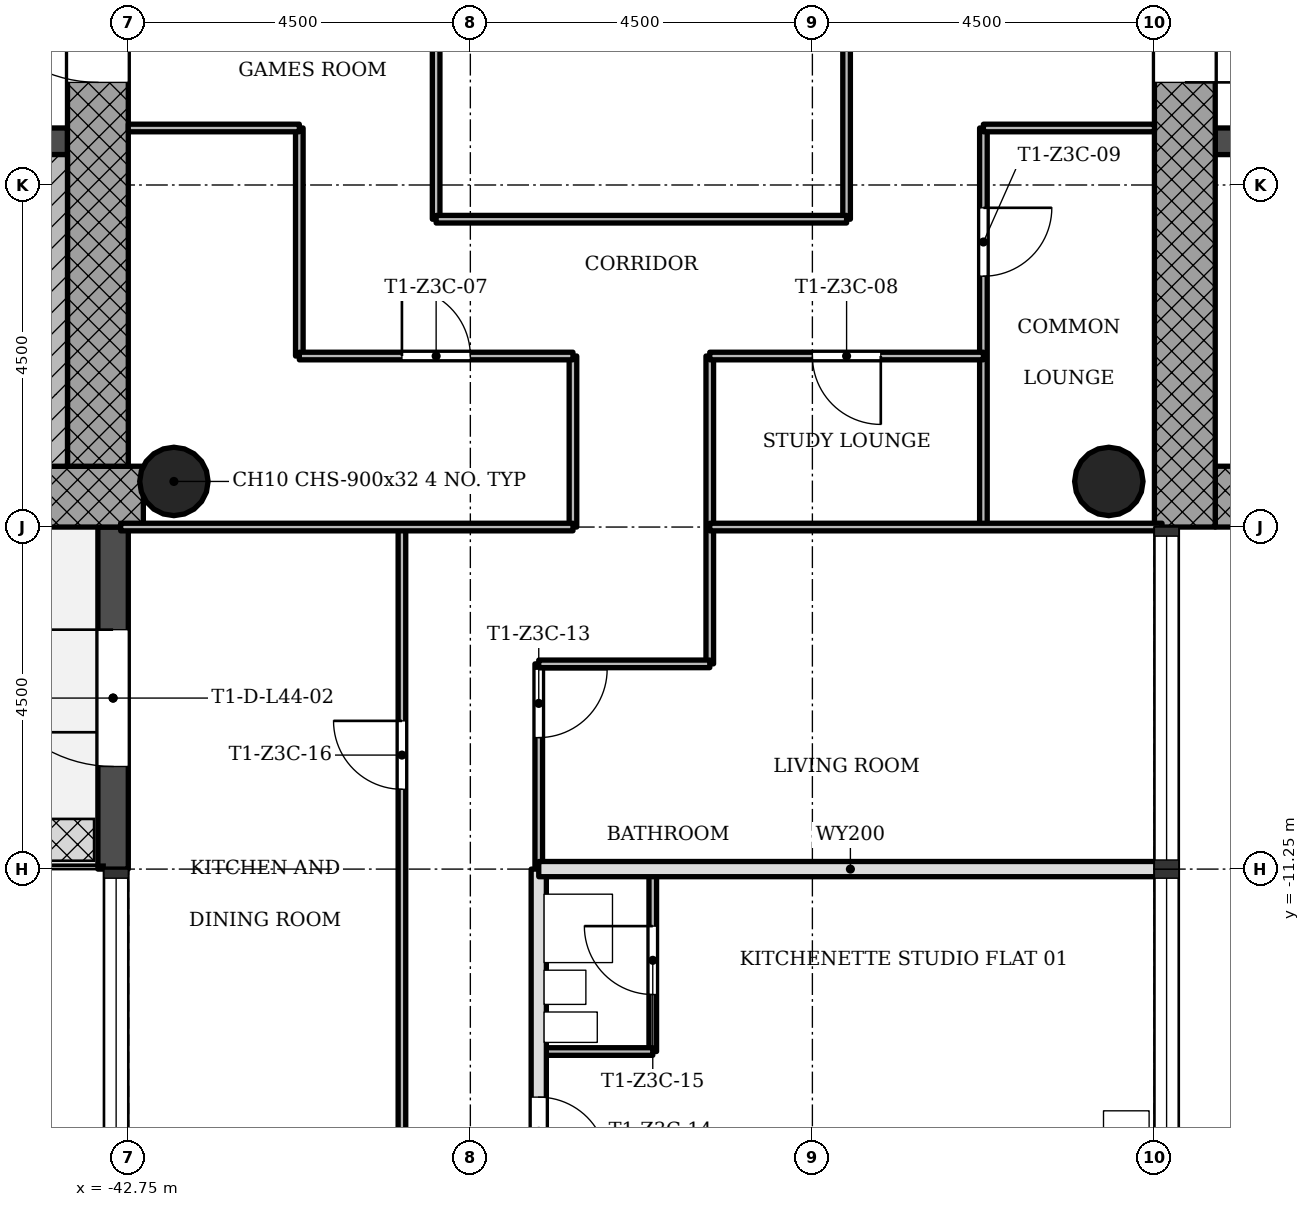
"""IFC4 building model, lengths in metres.
Left out: names, types, materials, properties, quantities, classifications, styles, units other than length and angle.
Written with IfcOpenShell. Run it as: python <this file> out.ifc"""

import sys

from ifc_helpers import new_model, si_unit, direction, frame, frame_2d, origin, origin_2d, place, context, subcontext, project, spatial, rectangle, hollow_circle, extrude, element, fill, save


model = new_model("IFC4")
c1 = context("Model", 3, precision=1e-05, world=origin(), true_north=direction((0.0, 1.0)))
c2 = subcontext(c1, "Body", "Model", "MODEL_VIEW")
j1 = project(units=[si_unit("LENGTHUNIT", "METRE"), si_unit("PLANEANGLEUNIT", "RADIAN")], contexts=[c1])
p1 = place(None, origin())
s1 = spatial("IfcSite", under=j1, at=p1, CompositionType="ELEMENT")
p2 = place(p1, origin())
s2 = spatial("IfcBuilding", under=s1, at=p2, CompositionType="ELEMENT")
p3 = place(p2, frame((0.0, 0.0, 160.9)))
s3 = spatial("IfcBuildingStorey", under=s2, at=p3, CompositionType="ELEMENT", Elevation=160.9)
p4 = place(p3, frame((-28.45, -6.35, 0.0), z_axis=(0.0, 0.0, 1.0), x_axis=(1.0, 0.0, 0.0)))
e1 = element("IfcWall", 1, at=p4, inside=s3, PredefinedType="SHEAR", context=c2, shape_type="SweptSolid", body=[
    extrude(rectangle(XDim=8.2, YDim=0.8, at=frame_2d((4.1, 0.0))), origin(), (0.0, 0.0, 1.0), 3.4),
])
p5 = place(p3, frame((-28.85, 5.95, 0.0), z_axis=(0.0, 0.0, 1.0), x_axis=(0.0, -1.0, 0.0)))
e2 = element("IfcWall", 2, at=p5, inside=s3, PredefinedType="SHEAR", context=c2, shape_type="SweptSolid", body=[
    extrude(rectangle(XDim=12.7, YDim=0.8, at=frame_2d((6.35, 0.0))), origin(), (0.0, 0.0, 1.0), 3.4),
])
p6 = place(p5, frame((5.05, 0.0, 0.0)))
e3 = element("IfcOpeningElement", 3, at=p6, cuts=e2, PredefinedType="OPENING", context=c2, shape_type="SweptSolid", body=[
    extrude(rectangle(XDim=1.8, YDim=2.1, at=frame_2d((0.9, 1.05))), frame((0.0, 0.41, 0.0), z_axis=(0.0, -1.0, 0.0), x_axis=(1.0, 0.0, 0.0)), (0.0, 0.0, 1.0), 0.82),
])
p7 = place(p3, frame((-28.45, -1.675, 0.0), z_axis=(0.0, 0.0, 1.0), x_axis=(1.0, 0.0, 0.0)))
e4 = element("IfcWall", 4, at=p7, inside=s3, PredefinedType="SHEAR", context=c2, shape_type="SweptSolid", body=[
    extrude(rectangle(XDim=7.4, YDim=0.35, at=frame_2d((3.7, 0.0))), origin(), (0.0, 0.0, 1.0), 3.4),
])
p8 = place(p7, frame((0.95, 0.0, 0.0)))
e5 = element("IfcOpeningElement", 5, at=p8, cuts=e4, PredefinedType="OPENING", context=c2, shape_type="SweptSolid", body=[
    extrude(rectangle(XDim=1.1, YDim=2.1, at=frame_2d((0.55, 1.05))), frame((0.0, 0.185, 0.0), z_axis=(0.0, -1.0, 0.0), x_axis=(1.0, 0.0, 0.0)), (0.0, 0.0, 1.0), 0.37),
])
p9 = place(p7, frame((3.15, 0.0, 0.0)))
e6 = element("IfcOpeningElement", 6, at=p9, cuts=e4, PredefinedType="OPENING", context=c2, shape_type="SweptSolid", body=[
    extrude(rectangle(XDim=1.1, YDim=2.1, at=frame_2d((0.55, 1.05))), frame((0.0, 0.185, 0.0), z_axis=(0.0, -1.0, 0.0), x_axis=(1.0, 0.0, 0.0)), (0.0, 0.0, 1.0), 0.37),
])
p10 = place(p7, frame((5.35, 0.0, 0.0)))
e7 = element("IfcOpeningElement", 7, at=p10, cuts=e4, PredefinedType="OPENING", context=c2, shape_type="SweptSolid", body=[
    extrude(rectangle(XDim=1.1, YDim=2.1, at=frame_2d((0.55, 1.05))), frame((0.0, 0.185, 0.0), z_axis=(0.0, -1.0, 0.0), x_axis=(1.0, 0.0, 0.0)), (0.0, 0.0, 1.0), 0.37),
])
p11 = place(p3, frame((-50.95, -6.35, 0.0), z_axis=(0.0, 0.0, 1.0), x_axis=(1.0, 0.0, 0.0)))
e8 = element("IfcWall", 8, at=p11, inside=s3, PredefinedType="SHEAR", context=c2, shape_type="SweptSolid", body=[
    extrude(rectangle(XDim=8.398, YDim=0.8, at=frame_2d((4.199, 0.0))), origin(), (0.0, 0.0, 1.0), 3.4),
])
p12 = place(p3, frame((-43.15, -5.95, 0.0), z_axis=(0.0, 0.0, 1.0), x_axis=(0.0, 1.0, 0.0)))
e9 = element("IfcWall", 9, at=p12, inside=s3, PredefinedType="SHEAR", context=c2, shape_type="SweptSolid", body=[
    extrude(rectangle(XDim=12.7, YDim=0.8, at=frame_2d((6.35, 0.0))), origin(), (0.0, 0.0, 1.0), 3.4),
])
p13 = place(p12, frame((5.05, 0.0, 0.0)))
e10 = element("IfcOpeningElement", 10, at=p13, cuts=e9, PredefinedType="OPENING", context=c2, shape_type="SweptSolid", body=[
    extrude(rectangle(XDim=1.8, YDim=2.1, at=frame_2d((0.9, 1.05))), frame((0.0, 0.41, 0.0), z_axis=(0.0, -1.0, 0.0), x_axis=(1.0, 0.0, 0.0)), (0.0, 0.0, 1.0), 0.82),
])
p14 = place(p3, frame((-50.95, -1.675, 0.0), z_axis=(0.0, 0.0, 1.0), x_axis=(1.0, 0.0, 0.0)))
e11 = element("IfcWall", 11, at=p14, inside=s3, PredefinedType="SHEAR", context=c2, shape_type="SweptSolid", body=[
    extrude(rectangle(XDim=7.4, YDim=0.35, at=frame_2d((3.7, 0.0))), origin(), (0.0, 0.0, 1.0), 3.4),
])
p15 = place(p14, frame((5.65, 0.0, 0.0)))
e12 = element("IfcOpeningElement", 12, at=p15, cuts=e11, PredefinedType="OPENING", context=c2, shape_type="SweptSolid", body=[
    extrude(rectangle(XDim=0.9, YDim=2.1, at=frame_2d((0.45, 1.05))), frame((0.0, 0.185, 0.0), z_axis=(0.0, -1.0, 0.0), x_axis=(1.0, 0.0, 0.0)), (0.0, 0.0, 1.0), 0.37),
])
for number, where, z_axis, x_axis in (
    (13, (-42.15, -6.15, 0.0), (0.0, 0.0, 1.0), (1.0, 0.0, 0.0)),
    (14, (-29.85, -6.15, 0.0), (0.0, 0.0, 1.0), (1.0, 0.0, 0.0)),
):
    element("IfcColumn", number, at=place(p3, frame(where, z_axis=z_axis, x_axis=x_axis)), inside=s3, PredefinedType="COLUMN", context=c2, shape_type="SweptSolid", body=[
        extrude(hollow_circle(Radius=0.45, WallThickness=0.032, at=origin_2d()), origin(), (0.0, 0.0, 1.0), 3.4),
    ])
p16 = place(p3, frame((-42.95, -6.75, -0.02), z_axis=(0.0, 0.0, 1.0), x_axis=(0.0, -1.0, 0.0)))
e15 = element("IfcWall", 15, at=p16, inside=s3, PredefinedType="STANDARD", context=c2, shape_type="SweptSolid", body=[
    extrude(rectangle(XDim=4.5, YDim=0.4, at=frame_2d((2.25, 0.0))), origin(), (0.0, 0.0, 1.0), 3.12),
])
p17 = place(p16, frame((1.35, 0.0, 0.02)))
e16 = element("IfcOpeningElement", 16, at=p17, cuts=e15, PredefinedType="OPENING", context=c2, shape_type="SweptSolid", body=[
    extrude(rectangle(XDim=1.8, YDim=2.1, at=frame_2d((0.9, 1.05))), frame((0.0, 0.21, 0.0), z_axis=(0.0, -1.0, 0.0), x_axis=(1.0, 0.0, 0.0)), (0.0, 0.0, 1.0), 0.42),
])
p18 = place(p3, frame((-40.5, -4.5, 0.0), z_axis=(0.0, 0.0, 1.0), x_axis=(0.0, 1.0, 0.0)))
e17 = element("IfcWall", 17, at=p18, inside=s3, PredefinedType="PARTITIONING", context=c2, shape_type="SweptSolid", body=[
    extrude(rectangle(XDim=3.0, YDim=0.1, at=frame_2d((1.5, 0.0))), origin(), (0.0, 0.0, 1.0), 3.0),
])
p19 = place(p3, frame((-39.15, -15.75, 0.0), z_axis=(0.0, 0.0, 1.0), x_axis=(0.0, 1.0, 0.0)))
e18 = element("IfcWall", 18, at=p19, inside=s3, PredefinedType="PARTITIONING", context=c2, shape_type="SweptSolid", body=[
    extrude(rectangle(XDim=9.0, YDim=0.1, at=frame_2d((4.5, 0.0))), origin(), (0.0, 0.0, 1.0), 3.0),
])
p20 = place(p19, frame((5.55, 0.0, 0.0)))
e19 = element("IfcOpeningElement", 19, at=p20, cuts=e18, PredefinedType="OPENING", context=c2, shape_type="SweptSolid", body=[
    extrude(rectangle(XDim=0.9, YDim=2.1, at=frame_2d((0.45, 1.05))), frame((0.0, 0.06, 0.0), z_axis=(0.0, -1.0, 0.0), x_axis=(1.0, 0.0, 0.0)), (0.0, 0.0, 1.0), 0.12),
])
p21 = place(p3, frame((-38.7, -2.7, 0.0), z_axis=(0.0, 0.0, 1.0), x_axis=(0.0, 1.0, 0.0)))
e20 = element("IfcWall", 20, at=p21, inside=s3, PredefinedType="PARTITIONING", context=c2, shape_type="SweptSolid", body=[
    extrude(rectangle(XDim=5.4, YDim=0.1, at=frame_2d((2.7, 0.0))), origin(), (0.0, 0.0, 1.0), 3.0),
])
p22 = place(p3, frame((-37.35, -11.25, 0.0), z_axis=(0.0, 0.0, 1.0), x_axis=(0.0, 1.0, 0.0)))
e21 = element("IfcWall", 21, at=p22, inside=s3, PredefinedType="PARTITIONING", context=c2, shape_type="SweptSolid", body=[
    extrude(rectangle(XDim=2.7, YDim=0.1, at=frame_2d((1.35, 0.0))), origin(), (0.0, 0.0, 1.0), 3.0),
])
p23 = place(p22, frame((1.73, 0.0, 0.0)))
e22 = element("IfcOpeningElement", 22, at=p23, cuts=e21, PredefinedType="OPENING", context=c2, shape_type="SweptSolid", body=[
    extrude(rectangle(XDim=0.9, YDim=2.1, at=frame_2d((0.45, 1.05))), frame((0.0, 0.06, 0.0), z_axis=(0.0, -1.0, 0.0), x_axis=(1.0, 0.0, 0.0)), (0.0, 0.0, 1.0), 0.12),
])
p24 = place(p3, frame((-37.35, -15.75, 0.0), z_axis=(0.0, 0.0, 1.0), x_axis=(0.0, 1.0, 0.0)))
e23 = element("IfcWall", 23, at=p24, inside=s3, PredefinedType="SOLIDWALL", context=c2, shape_type="SweptSolid", body=[
    extrude(rectangle(XDim=4.5, YDim=0.2, at=frame_2d((2.25, 0.0))), origin(), (0.0, 0.0, 1.0), 3.0),
])
p25 = place(p24, frame((0.6, 0.0, 0.0)))
e24 = element("IfcOpeningElement", 24, at=p25, cuts=e23, PredefinedType="OPENING", context=c2, shape_type="SweptSolid", body=[
    extrude(rectangle(XDim=0.9, YDim=2.1, at=frame_2d((0.45, 1.05))), frame((0.0, 0.11, 0.0), z_axis=(0.0, -1.0, 0.0), x_axis=(1.0, 0.0, 0.0)), (0.0, 0.0, 1.0), 0.22),
])
p26 = place(p3, frame((-36.9, -6.75, 0.0), z_axis=(0.0, 0.0, 1.0), x_axis=(0.0, 1.0, 0.0)))
e25 = element("IfcWall", 25, at=p26, inside=s3, PredefinedType="PARTITIONING", context=c2, shape_type="SweptSolid", body=[
    extrude(rectangle(XDim=2.25, YDim=0.1, at=frame_2d((1.125, 0.0))), origin(), (0.0, 0.0, 1.0), 3.0),
])
p27 = place(p3, frame((-35.85, -13.65, 0.0), z_axis=(0.0, 0.0, 1.0), x_axis=(0.0, 1.0, 0.0)))
e26 = element("IfcWall", 26, at=p27, inside=s3, PredefinedType="PARTITIONING", context=c2, shape_type="SweptSolid", body=[
    extrude(rectangle(XDim=2.4, YDim=0.1, at=frame_2d((1.2, 0.0))), origin(), (0.0, 0.0, 1.0), 3.0),
])
p28 = place(p27, frame((0.75, 0.0, 0.0)))
e27 = element("IfcOpeningElement", 27, at=p28, cuts=e26, PredefinedType="OPENING", context=c2, shape_type="SweptSolid", body=[
    extrude(rectangle(XDim=0.9, YDim=2.1, at=frame_2d((0.45, 1.05))), frame((0.0, 0.06, 0.0), z_axis=(0.0, -1.0, 0.0), x_axis=(1.0, 0.0, 0.0)), (0.0, 0.0, 1.0), 0.12),
])
p29 = place(p3, frame((-35.1, -8.55, 0.0), z_axis=(0.0, 0.0, 1.0), x_axis=(0.0, 1.0, 0.0)))
e28 = element("IfcWall", 28, at=p29, inside=s3, PredefinedType="PARTITIONING", context=c2, shape_type="SweptSolid", body=[
    extrude(rectangle(XDim=4.05, YDim=0.1, at=frame_2d((2.025, 0.0))), origin(), (0.0, 0.0, 1.0), 3.0),
])
p30 = place(p3, frame((-33.3, -2.7, 0.0), z_axis=(0.0, 0.0, 1.0), x_axis=(0.0, 1.0, 0.0)))
e29 = element("IfcWall", 29, at=p30, inside=s3, PredefinedType="PARTITIONING", context=c2, shape_type="SweptSolid", body=[
    extrude(rectangle(XDim=5.4, YDim=0.1, at=frame_2d((2.7, 0.0))), origin(), (0.0, 0.0, 1.0), 3.0),
])
p31 = place(p30, frame((2.25, 0.0, 0.0)))
e30 = element("IfcOpeningElement", 30, at=p31, cuts=e29, PredefinedType="OPENING", context=c2, shape_type="SweptSolid", body=[
    extrude(rectangle(XDim=0.9, YDim=2.1, at=frame_2d((0.45, 1.05))), frame((0.0, 0.06, 0.0), z_axis=(0.0, -1.0, 0.0), x_axis=(1.0, 0.0, 0.0)), (0.0, 0.0, 1.0), 0.12),
])
p32 = place(p3, frame((-31.5, -6.75, 0.0), z_axis=(0.0, 0.0, 1.0), x_axis=(0.0, 1.0, 0.0)))
e31 = element("IfcWall", 31, at=p32, inside=s3, PredefinedType="PARTITIONING", context=c2, shape_type="SweptSolid", body=[
    extrude(rectangle(XDim=5.25, YDim=0.1, at=frame_2d((2.625, 0.0))), origin(), (0.0, 0.0, 1.0), 3.0),
])
p33 = place(p32, frame((3.3, 0.0, 0.0)))
e32 = element("IfcOpeningElement", 32, at=p33, cuts=e31, PredefinedType="OPENING", context=c2, shape_type="SweptSolid", body=[
    extrude(rectangle(XDim=0.9, YDim=2.1, at=frame_2d((0.45, 1.05))), frame((0.0, 0.06, 0.0), z_axis=(0.0, -1.0, 0.0), x_axis=(1.0, 0.0, 0.0)), (0.0, 0.0, 1.0), 0.12),
])
p34 = place(p3, frame((-37.35, -13.65, 0.0), z_axis=(0.0, 0.0, 1.0), x_axis=(1.0, 0.0, 0.0)))
e33 = element("IfcWall", 33, at=p34, inside=s3, PredefinedType="PARTITIONING", context=c2, shape_type="SweptSolid", body=[
    extrude(rectangle(XDim=1.5, YDim=0.1, at=frame_2d((0.75, 0.0))), origin(), (0.0, 0.0, 1.0), 3.0),
])
p35 = place(p3, frame((-37.35, -11.25, 0.0), z_axis=(0.0, 0.0, 1.0), x_axis=(1.0, 0.0, 0.0)))
e34 = element("IfcWall", 34, at=p35, inside=s3, PredefinedType="SOLIDWALL", context=c2, shape_type="SweptSolid", body=[
    extrude(rectangle(XDim=8.2, YDim=0.2, at=frame_2d((4.1, 0.0))), origin(), (0.0, 0.0, 1.0), 3.0),
])
p36 = place(p3, frame((-37.35, -8.55, 0.0), z_axis=(0.0, 0.0, 1.0), x_axis=(1.0, 0.0, 0.0)))
e35 = element("IfcWall", 35, at=p36, inside=s3, PredefinedType="PARTITIONING", context=c2, shape_type="SweptSolid", body=[
    extrude(rectangle(XDim=2.25, YDim=0.1, at=frame_2d((1.125, 0.0))), origin(), (0.0, 0.0, 1.0), 3.0),
])
for number, where, z_axis, x_axis in (
    (36, (-42.85, -6.75, 0.0), (0.0, 0.0, 1.0), (1.0, 0.0, 0.0)),
    (37, (-35.1, -6.75, 0.0), (0.0, 0.0, 1.0), (1.0, 0.0, 0.0)),
):
    element("IfcWall", number, at=place(p3, frame(where, z_axis=z_axis, x_axis=x_axis)), inside=s3, PredefinedType="PARTITIONING", context=c2, shape_type="SweptSolid", body=[
        extrude(rectangle(XDim=5.95, YDim=0.1, at=frame_2d((2.975, 0.0))), origin(), (0.0, 0.0, 1.0), 3.0),
    ])
p37 = place(p3, frame((-40.5, -4.5, 0.0), z_axis=(0.0, 0.0, 1.0), x_axis=(1.0, 0.0, 0.0)))
e38 = element("IfcWall", 38, at=p37, inside=s3, PredefinedType="PARTITIONING", context=c2, shape_type="SweptSolid", body=[
    extrude(rectangle(XDim=3.6, YDim=0.1, at=frame_2d((1.8, 0.0))), origin(), (0.0, 0.0, 1.0), 3.0),
])
p38 = place(p37, frame((1.35, 0.0, 0.0)))
e39 = element("IfcOpeningElement", 39, at=p38, cuts=e38, PredefinedType="OPENING", context=c2, shape_type="SweptSolid", body=[
    extrude(rectangle(XDim=0.9, YDim=2.1, at=frame_2d((0.45, 1.05))), frame((0.0, 0.06, 0.0), z_axis=(0.0, -1.0, 0.0), x_axis=(1.0, 0.0, 0.0)), (0.0, 0.0, 1.0), 0.12),
])
p39 = place(p3, frame((-35.1, -4.5, 0.0), z_axis=(0.0, 0.0, 1.0), x_axis=(1.0, 0.0, 0.0)))
e40 = element("IfcWall", 40, at=p39, inside=s3, PredefinedType="PARTITIONING", context=c2, shape_type="SweptSolid", body=[
    extrude(rectangle(XDim=3.6, YDim=0.1, at=frame_2d((1.8, 0.0))), origin(), (0.0, 0.0, 1.0), 3.0),
])
p40 = place(p39, frame((1.35, 0.0, 0.0)))
e41 = element("IfcOpeningElement", 41, at=p40, cuts=e40, PredefinedType="OPENING", context=c2, shape_type="SweptSolid", body=[
    extrude(rectangle(XDim=0.9, YDim=2.1, at=frame_2d((0.45, 1.05))), frame((0.0, 0.06, 0.0), z_axis=(0.0, -1.0, 0.0), x_axis=(1.0, 0.0, 0.0)), (0.0, 0.0, 1.0), 0.12),
])
p41 = place(p3, frame((-38.7, -2.7, 0.0), z_axis=(0.0, 0.0, 1.0), x_axis=(1.0, 0.0, 0.0)))
e42 = element("IfcWall", 42, at=p41, inside=s3, PredefinedType="PARTITIONING", context=c2, shape_type="SweptSolid", body=[
    extrude(rectangle(XDim=5.4, YDim=0.1, at=frame_2d((2.7, 0.0))), origin(), (0.0, 0.0, 1.0), 3.0),
])
for number, where, z_axis, x_axis in (
    (43, (-42.75, -1.5, 0.0), (0.0, 0.0, 1.0), (1.0, 0.0, 0.0)),
    (44, (-31.5, -1.5, 0.0), (0.0, 0.0, 1.0), (1.0, 0.0, 0.0)),
):
    element("IfcWall", number, at=place(p3, frame(where, z_axis=z_axis, x_axis=x_axis)), inside=s3, PredefinedType="PARTITIONING", context=c2, shape_type="SweptSolid", body=[
        extrude(rectangle(XDim=2.25, YDim=0.1, at=frame_2d((1.125, 0.0))), origin(), (0.0, 0.0, 1.0), 3.0),
    ])
p42 = place(p3, frame((-43.75, -1.85, 0.0), z_axis=(0.0, 0.0, 1.0), x_axis=(0.0, -1.0, 0.0)))
e45 = element("IfcWall", 45, at=p42, inside=s3, PredefinedType="SHEAR", context=c2, shape_type="SweptSolid", body=[
    extrude(rectangle(XDim=4.1, YDim=0.4, at=frame_2d((2.05, 0.0))), origin(), (0.0, 0.0, 1.0), 3.4),
])
p43 = place(p17, origin())
e46 = element("IfcDoor", 46, at=p43, inside=s3, OperationType="SINGLE_SWING_LEFT", PredefinedType="DOOR", context=c2, shape_type="SweptSolid", body=[
    extrude(rectangle(XDim=1.8, YDim=2.1, at=frame_2d((0.9, 1.05))), frame((0.0, 0.025, 0.0), z_axis=(0.0, -1.0, 0.0), x_axis=(1.0, 0.0, 0.0)), (0.0, 0.0, 1.0), 0.05),
])
fill(e16, e46)
p44 = place(p38, origin())
e47 = element("IfcDoor", 47, at=p44, inside=s3, OperationType="SINGLE_SWING_RIGHT", PredefinedType="DOOR", context=c2, shape_type="SweptSolid", body=[
    extrude(rectangle(XDim=0.9, YDim=2.1, at=frame_2d((0.45, 1.05))), frame((0.0, 0.025, 0.0), z_axis=(0.0, -1.0, 0.0), x_axis=(1.0, 0.0, 0.0)), (0.0, 0.0, 1.0), 0.05),
])
fill(e39, e47)
p45 = place(p40, origin())
e48 = element("IfcDoor", 48, at=p45, inside=s3, OperationType="SINGLE_SWING_RIGHT", PredefinedType="DOOR", context=c2, shape_type="SweptSolid", body=[
    extrude(rectangle(XDim=0.9, YDim=2.1, at=frame_2d((0.45, 1.05))), frame((0.0, 0.025, 0.0), z_axis=(0.0, -1.0, 0.0), x_axis=(1.0, 0.0, 0.0)), (0.0, 0.0, 1.0), 0.05),
])
fill(e41, e48)
p46 = place(p33, origin())
e49 = element("IfcDoor", 49, at=p46, inside=s3, OperationType="SINGLE_SWING_RIGHT", PredefinedType="DOOR", context=c2, shape_type="SweptSolid", body=[
    extrude(rectangle(XDim=0.9, YDim=2.1, at=frame_2d((0.45, 1.05))), frame((0.0, 0.025, 0.0), z_axis=(0.0, -1.0, 0.0), x_axis=(1.0, 0.0, 0.0)), (0.0, 0.0, 1.0), 0.05),
])
fill(e32, e49)
p47 = place(p23, origin())
e50 = element("IfcDoor", 50, at=p47, inside=s3, OperationType="SINGLE_SWING_RIGHT", PredefinedType="DOOR", context=c2, shape_type="SweptSolid", body=[
    extrude(rectangle(XDim=0.9, YDim=2.1, at=frame_2d((0.45, 1.05))), frame((0.0, 0.025, 0.0), z_axis=(0.0, -1.0, 0.0), x_axis=(1.0, 0.0, 0.0)), (0.0, 0.0, 1.0), 0.05),
])
fill(e22, e50)
p48 = place(p25, origin())
e51 = element("IfcDoor", 51, at=p48, inside=s3, OperationType="SINGLE_SWING_LEFT", PredefinedType="DOOR", context=c2, shape_type="SweptSolid", body=[
    extrude(rectangle(XDim=0.9, YDim=2.1, at=frame_2d((0.45, 1.05))), frame((0.0, 0.025, 0.0), z_axis=(0.0, -1.0, 0.0), x_axis=(1.0, 0.0, 0.0)), (0.0, 0.0, 1.0), 0.05),
])
fill(e24, e51)
p49 = place(p28, origin())
e52 = element("IfcDoor", 52, at=p49, inside=s3, OperationType="SINGLE_SWING_LEFT", PredefinedType="DOOR", context=c2, shape_type="SweptSolid", body=[
    extrude(rectangle(XDim=0.9, YDim=2.1, at=frame_2d((0.45, 1.05))), frame((0.0, 0.025, 0.0), z_axis=(0.0, -1.0, 0.0), x_axis=(1.0, 0.0, 0.0)), (0.0, 0.0, 1.0), 0.05),
])
fill(e27, e52)
p50 = place(p20, origin())
e53 = element("IfcDoor", 53, at=p50, inside=s3, OperationType="SINGLE_SWING_LEFT", PredefinedType="DOOR", context=c2, shape_type="SweptSolid", body=[
    extrude(rectangle(XDim=0.9, YDim=2.1, at=frame_2d((0.45, 1.05))), frame((0.0, 0.025, 0.0), z_axis=(0.0, -1.0, 0.0), x_axis=(1.0, 0.0, 0.0)), (0.0, 0.0, 1.0), 0.05),
])
fill(e19, e53)
p51 = place(p6, origin())
e54 = element("IfcDoor", 54, at=p51, inside=s3, OperationType="SINGLE_SWING_LEFT", PredefinedType="DOOR", context=c2, shape_type="SweptSolid", body=[
    extrude(rectangle(XDim=1.8, YDim=2.1, at=frame_2d((0.9, 1.05))), frame((0.0, 0.025, 0.0), z_axis=(0.0, -1.0, 0.0), x_axis=(1.0, 0.0, 0.0)), (0.0, 0.0, 1.0), 0.05),
])
fill(e3, e54)
p52 = place(p13, origin())
e55 = element("IfcDoor", 55, at=p52, inside=s3, OperationType="SINGLE_SWING_LEFT", PredefinedType="DOOR", context=c2, shape_type="SweptSolid", body=[
    extrude(rectangle(XDim=1.8, YDim=2.1, at=frame_2d((0.9, 1.05))), frame((0.0, 0.025, 0.0), z_axis=(0.0, -1.0, 0.0), x_axis=(1.0, 0.0, 0.0)), (0.0, 0.0, 1.0), 0.05),
])
fill(e10, e55)
save(model, sys.argv[1])
